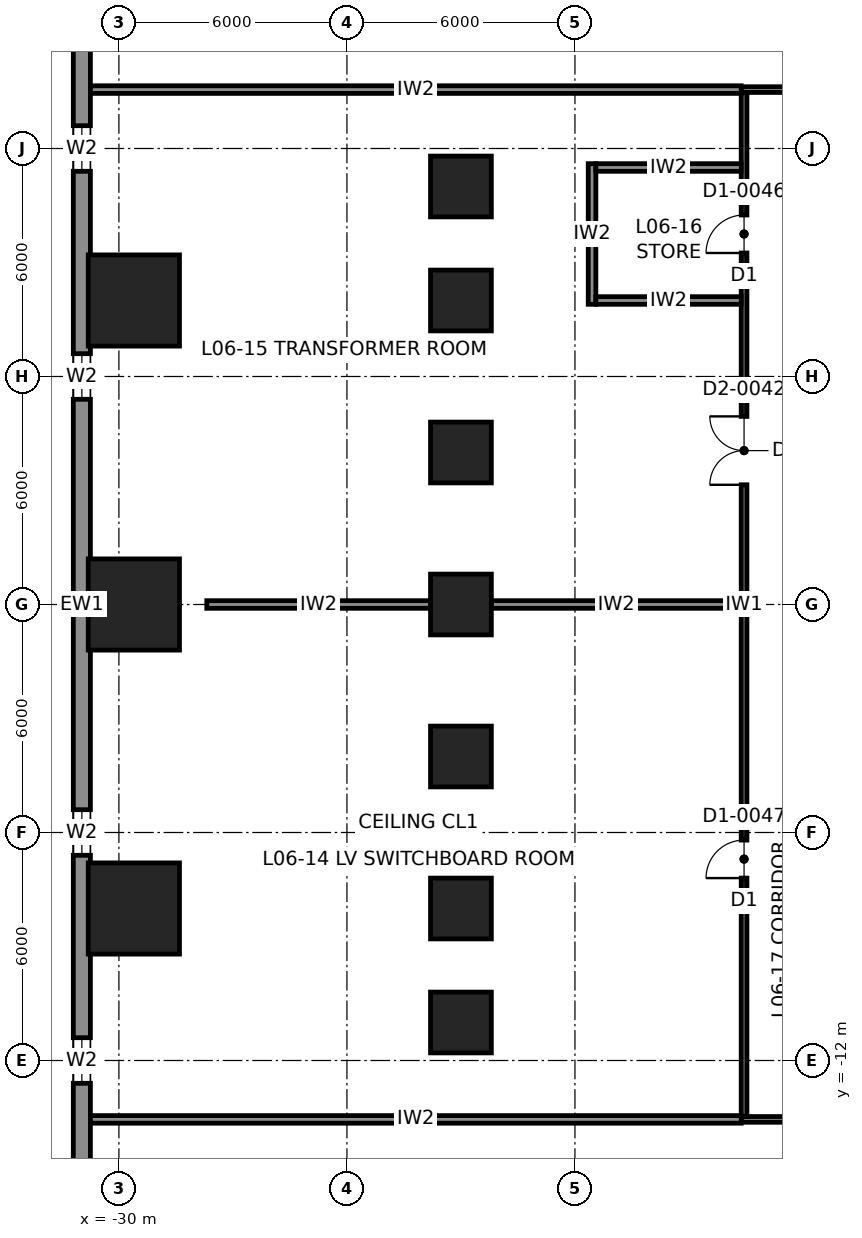
"""IFC4 building model, lengths in metres.
Left out: names, types, materials, properties, quantities, classifications, styles, units other than length and angle.
Written with IfcOpenShell. Run it as: python <this file> out.ifc"""

import sys

from ifc_helpers import new_model, si_unit, direction, frame, frame_2d, origin, origin_2d, place, context, subcontext, project, spatial, rectangle, extrude, element, fill, save


model = new_model("IFC4")
c1 = context("Model", 3, precision=1e-05, world=origin(), true_north=direction((0.0, 1.0)))
c2 = subcontext(c1, "Body", "Model", "MODEL_VIEW")
j1 = project(units=[si_unit("LENGTHUNIT", "METRE"), si_unit("PLANEANGLEUNIT", "RADIAN")], contexts=[c1])
p1 = place(None, origin())
s1 = spatial("IfcSite", under=j1, at=p1, CompositionType="ELEMENT")
p2 = place(p1, origin())
s2 = spatial("IfcBuilding", under=s1, at=p2, CompositionType="ELEMENT")
p3 = place(p2, frame((0.0, 0.0, 32.0)))
s3 = spatial("IfcBuildingStorey", under=s2, at=p3, CompositionType="ELEMENT", Elevation=32.0)
for number, where, z_axis, x_axis in (
    (1, (-29.606, 0.0, 0.0), (0.04, 0.0, 0.999), (0.0, 1.0, 0.0)),
    (2, (-29.606, 8.0, 0.0), (0.04, 0.0, 0.999), (0.0, 1.0, 0.0)),
    (3, (-29.606, -8.0, 0.0), (0.04, 0.0, 0.999), (0.0, 1.0, 0.0)),
):
    element("IfcColumn", number, at=place(p3, frame(where, z_axis=z_axis, x_axis=x_axis)), inside=s3, PredefinedType="COLUMN", context=c2, shape_type="SweptSolid", body=[
        extrude(rectangle(XDim=2.4, YDim=2.4, at=origin_2d()), origin(), (0.0, 0.0, 1.0), 5.504),
    ])
for number, where, z_axis, x_axis in (
    (4, (-21.0, 0.0, 0.0), (0.0, 0.0, 1.0), (1.0, 0.0, 0.0)),
    (5, (-21.0, 4.0, 0.0), (0.0, 0.0, 1.0), (1.0, 0.0, 0.0)),
    (6, (-21.0, -4.0, 0.0), (0.0, 0.0, 1.0), (1.0, 0.0, 0.0)),
    (7, (-21.0, 8.0, 0.0), (0.0, 0.0, 1.0), (1.0, 0.0, 0.0)),
    (8, (-21.0, -8.0, 0.0), (0.0, 0.0, 1.0), (1.0, 0.0, 0.0)),
    (9, (-21.0, 11.0, 0.0), (0.0, 0.0, 1.0), (1.0, 0.0, 0.0)),
    (10, (-21.0, -11.0, 0.0), (0.0, 0.0, 1.0), (1.0, 0.0, 0.0)),
):
    element("IfcColumn", number, at=place(p3, frame(where, z_axis=z_axis, x_axis=x_axis)), inside=s3, PredefinedType="COLUMN", context=c2, shape_type="SweptSolid", body=[
        extrude(rectangle(XDim=1.6, YDim=1.6, at=origin_2d()), origin(), (0.0, 0.0, 1.0), 5.5),
    ])
p4 = place(p3, frame((-30.975, 26.7, 0.0), z_axis=(0.0, 0.0, 1.0), x_axis=(0.0, -1.0, 0.0)))
e11 = element("IfcWall", 11, at=p4, inside=s3, PredefinedType="SOLIDWALL", context=c2, shape_type="SweptSolid", body=[
    extrude(rectangle(XDim=53.4, YDim=0.45, at=frame_2d((26.7, 0.0))), origin(), (0.0, 0.0, 1.0), 5.3),
])
p5 = place(p4, frame((8.1, 0.0, 0.9)))
e12 = element("IfcOpeningElement", 12, at=p5, cuts=e11, PredefinedType="OPENING", context=c2, shape_type="SweptSolid", body=[
    extrude(rectangle(XDim=1.2, YDim=2.0, at=frame_2d((0.6, 1.0))), frame((0.0, 0.235, 0.0), z_axis=(0.0, -1.0, 0.0), x_axis=(1.0, 0.0, 0.0)), (0.0, 0.0, 1.0), 0.47),
])
p6 = place(p4, frame((14.1, 0.0, 0.9)))
e13 = element("IfcOpeningElement", 13, at=p6, cuts=e11, PredefinedType="OPENING", context=c2, shape_type="SweptSolid", body=[
    extrude(rectangle(XDim=1.2, YDim=2.0, at=frame_2d((0.6, 1.0))), frame((0.0, 0.235, 0.0), z_axis=(0.0, -1.0, 0.0), x_axis=(1.0, 0.0, 0.0)), (0.0, 0.0, 1.0), 0.47),
])
p7 = place(p4, frame((20.1, 0.0, 0.9)))
e14 = element("IfcOpeningElement", 14, at=p7, cuts=e11, PredefinedType="OPENING", context=c2, shape_type="SweptSolid", body=[
    extrude(rectangle(XDim=1.2, YDim=2.0, at=frame_2d((0.6, 1.0))), frame((0.0, 0.235, 0.0), z_axis=(0.0, -1.0, 0.0), x_axis=(1.0, 0.0, 0.0)), (0.0, 0.0, 1.0), 0.47),
])
p8 = place(p4, frame((32.1, 0.0, 0.9)))
e15 = element("IfcOpeningElement", 15, at=p8, cuts=e11, PredefinedType="OPENING", context=c2, shape_type="SweptSolid", body=[
    extrude(rectangle(XDim=1.2, YDim=2.0, at=frame_2d((0.6, 1.0))), frame((0.0, 0.235, 0.0), z_axis=(0.0, -1.0, 0.0), x_axis=(1.0, 0.0, 0.0)), (0.0, 0.0, 1.0), 0.47),
])
p9 = place(p4, frame((38.1, 0.0, 0.9)))
e16 = element("IfcOpeningElement", 16, at=p9, cuts=e11, PredefinedType="OPENING", context=c2, shape_type="SweptSolid", body=[
    extrude(rectangle(XDim=1.2, YDim=2.0, at=frame_2d((0.6, 1.0))), frame((0.0, 0.235, 0.0), z_axis=(0.0, -1.0, 0.0), x_axis=(1.0, 0.0, 0.0)), (0.0, 0.0, 1.0), 0.47),
])
p10 = place(p4, frame((44.1, 0.0, 0.9)))
e17 = element("IfcOpeningElement", 17, at=p10, cuts=e11, PredefinedType="OPENING", context=c2, shape_type="SweptSolid", body=[
    extrude(rectangle(XDim=1.2, YDim=2.0, at=frame_2d((0.6, 1.0))), frame((0.0, 0.235, 0.0), z_axis=(0.0, -1.0, 0.0), x_axis=(1.0, 0.0, 0.0)), (0.0, 0.0, 1.0), 0.47),
])
p11 = place(p3, frame((-13.625, 13.55, 0.0), z_axis=(0.0, 0.0, 1.0), x_axis=(1.0, 0.0, 0.0)))
e18 = element("IfcWall", 18, at=p11, inside=s3, PredefinedType="PARTITIONING", context=c2, shape_type="SweptSolid", body=[
    extrude(rectangle(XDim=27.25, YDim=0.15, at=frame_2d((13.625, 0.0))), origin(), (0.0, 0.0, 1.0), 5.3),
])
p12 = place(p11, frame((2.025, 0.0, 0.0)))
e19 = element("IfcOpeningElement", 19, at=p12, cuts=e18, PredefinedType="OPENING", context=c2, shape_type="SweptSolid", body=[
    extrude(rectangle(XDim=1.8, YDim=2.3, at=frame_2d((0.9, 1.15))), frame((0.0, 0.085, 0.0), z_axis=(0.0, -1.0, 0.0), x_axis=(1.0, 0.0, 0.0)), (0.0, 0.0, 1.0), 0.17),
])
p13 = place(p11, frame((7.225, 0.0, 0.0)))
e20 = element("IfcOpeningElement", 20, at=p13, cuts=e18, PredefinedType="OPENING", context=c2, shape_type="SweptSolid", body=[
    extrude(rectangle(XDim=1.8, YDim=2.3, at=frame_2d((0.9, 1.15))), frame((0.0, 0.085, 0.0), z_axis=(0.0, -1.0, 0.0), x_axis=(1.0, 0.0, 0.0)), (0.0, 0.0, 1.0), 0.17),
])
p14 = place(p11, frame((12.725, 0.0, 0.0)))
e21 = element("IfcOpeningElement", 21, at=p14, cuts=e18, PredefinedType="OPENING", context=c2, shape_type="SweptSolid", body=[
    extrude(rectangle(XDim=1.8, YDim=2.3, at=frame_2d((0.9, 1.15))), frame((0.0, 0.085, 0.0), z_axis=(0.0, -1.0, 0.0), x_axis=(1.0, 0.0, 0.0)), (0.0, 0.0, 1.0), 0.17),
])
p15 = place(p11, frame((18.225, 0.0, 0.0)))
e22 = element("IfcOpeningElement", 22, at=p15, cuts=e18, PredefinedType="OPENING", context=c2, shape_type="SweptSolid", body=[
    extrude(rectangle(XDim=1.8, YDim=2.3, at=frame_2d((0.9, 1.15))), frame((0.0, 0.085, 0.0), z_axis=(0.0, -1.0, 0.0), x_axis=(1.0, 0.0, 0.0)), (0.0, 0.0, 1.0), 0.17),
])
p16 = place(p11, frame((23.425, 0.0, 0.0)))
e23 = element("IfcOpeningElement", 23, at=p16, cuts=e18, PredefinedType="OPENING", context=c2, shape_type="SweptSolid", body=[
    extrude(rectangle(XDim=1.8, YDim=2.3, at=frame_2d((0.9, 1.15))), frame((0.0, 0.085, 0.0), z_axis=(0.0, -1.0, 0.0), x_axis=(1.0, 0.0, 0.0)), (0.0, 0.0, 1.0), 0.17),
])
p17 = place(p3, frame((13.625, -13.55, 0.0), z_axis=(0.0, 0.0, 1.0), x_axis=(-1.0, 0.0, 0.0)))
e24 = element("IfcWall", 24, at=p17, inside=s3, PredefinedType="PARTITIONING", context=c2, shape_type="SweptSolid", body=[
    extrude(rectangle(XDim=27.25, YDim=0.15, at=frame_2d((13.625, 0.0))), origin(), (0.0, 0.0, 1.0), 5.3),
])
p18 = place(p17, frame((23.425, 0.0, 0.0)))
e25 = element("IfcOpeningElement", 25, at=p18, cuts=e24, PredefinedType="OPENING", context=c2, shape_type="SweptSolid", body=[
    extrude(rectangle(XDim=1.8, YDim=2.3, at=frame_2d((0.9, 1.15))), frame((0.0, 0.085, 0.0), z_axis=(0.0, -1.0, 0.0), x_axis=(1.0, 0.0, 0.0)), (0.0, 0.0, 1.0), 0.17),
])
p19 = place(p17, frame((19.575, 0.0, 0.0)))
e26 = element("IfcOpeningElement", 26, at=p19, cuts=e24, PredefinedType="OPENING", context=c2, shape_type="SweptSolid", body=[
    extrude(rectangle(XDim=1.0, YDim=2.3, at=frame_2d((0.5, 1.15))), frame((0.0, 0.085, 0.0), z_axis=(0.0, -1.0, 0.0), x_axis=(1.0, 0.0, 0.0)), (0.0, 0.0, 1.0), 0.17),
])
p20 = place(p17, frame((2.025, 0.0, 0.0)))
e27 = element("IfcOpeningElement", 27, at=p20, cuts=e24, PredefinedType="OPENING", context=c2, shape_type="SweptSolid", body=[
    extrude(rectangle(XDim=1.8, YDim=2.3, at=frame_2d((0.9, 1.15))), frame((0.0, 0.085, 0.0), z_axis=(0.0, -1.0, 0.0), x_axis=(1.0, 0.0, 0.0)), (0.0, 0.0, 1.0), 0.17),
])
p21 = place(p17, frame((16.125, 0.0, 0.0)))
e28 = element("IfcOpeningElement", 28, at=p21, cuts=e24, PredefinedType="OPENING", context=c2, shape_type="SweptSolid", body=[
    extrude(rectangle(XDim=1.0, YDim=2.3, at=frame_2d((0.5, 1.15))), frame((0.0, 0.085, 0.0), z_axis=(0.0, -1.0, 0.0), x_axis=(1.0, 0.0, 0.0)), (0.0, 0.0, 1.0), 0.17),
])
p22 = place(p17, frame((9.625, 0.0, 0.0)))
e29 = element("IfcOpeningElement", 29, at=p22, cuts=e24, PredefinedType="OPENING", context=c2, shape_type="SweptSolid", body=[
    extrude(rectangle(XDim=1.0, YDim=2.3, at=frame_2d((0.5, 1.15))), frame((0.0, 0.085, 0.0), z_axis=(0.0, -1.0, 0.0), x_axis=(1.0, 0.0, 0.0)), (0.0, 0.0, 1.0), 0.17),
])
p23 = place(p3, frame((-13.55, 13.475, 0.0), z_axis=(0.0, 0.0, 1.0), x_axis=(0.0, -1.0, 0.0)))
e30 = element("IfcWall", 30, at=p23, inside=s3, PredefinedType="PARTITIONING", context=c2, shape_type="SweptSolid", body=[
    extrude(rectangle(XDim=26.95, YDim=0.15, at=frame_2d((13.475, 0.0))), origin(), (0.0, 0.0, 1.0), 5.3),
])
p24 = place(p23, frame((19.675, 0.0, 0.0)))
e31 = element("IfcOpeningElement", 31, at=p24, cuts=e30, PredefinedType="OPENING", context=c2, shape_type="SweptSolid", body=[
    extrude(rectangle(XDim=1.0, YDim=2.3, at=frame_2d((0.5, 1.15))), frame((0.0, 0.085, 0.0), z_axis=(0.0, -1.0, 0.0), x_axis=(1.0, 0.0, 0.0)), (0.0, 0.0, 1.0), 0.17),
])
p25 = place(p23, frame((8.525, 0.0, 0.0)))
e32 = element("IfcOpeningElement", 32, at=p25, cuts=e30, PredefinedType="OPENING", context=c2, shape_type="SweptSolid", body=[
    extrude(rectangle(XDim=1.8, YDim=2.3, at=frame_2d((0.9, 1.15))), frame((0.0, 0.085, 0.0), z_axis=(0.0, -1.0, 0.0), x_axis=(1.0, 0.0, 0.0)), (0.0, 0.0, 1.0), 0.17),
])
p26 = place(p23, frame((3.225, 0.0, 0.0)))
e33 = element("IfcOpeningElement", 33, at=p26, cuts=e30, PredefinedType="OPENING", context=c2, shape_type="SweptSolid", body=[
    extrude(rectangle(XDim=1.0, YDim=2.3, at=frame_2d((0.5, 1.15))), frame((0.0, 0.085, 0.0), z_axis=(0.0, -1.0, 0.0), x_axis=(1.0, 0.0, 0.0)), (0.0, 0.0, 1.0), 0.17),
])
for number, where, z_axis, x_axis in (
    (34, (-30.75, 13.55, 0.0), (0.0, 0.0, 1.0), (1.0, 0.0, 0.0)),
    (35, (-13.625, -13.55, 0.0), (0.0, 0.0, 1.0), (-1.0, 0.0, 0.0)),
):
    element("IfcWall", number, at=place(p3, frame(where, z_axis=z_axis, x_axis=x_axis)), inside=s3, PredefinedType="PARTITIONING", context=c2, shape_type="SweptSolid", body=[
        extrude(rectangle(XDim=17.125, YDim=0.2, at=frame_2d((8.562, 0.0))), origin(), (0.0, 0.0, 1.0), 5.3),
    ])
p27 = place(p3, frame((-13.625, 0.0, 0.0), z_axis=(0.0, 0.0, 1.0), x_axis=(-1.0, 0.0, 0.0)))
e36 = element("IfcWall", 36, at=p27, inside=s3, PredefinedType="PARTITIONING", context=c2, shape_type="SweptSolid", body=[
    extrude(rectangle(XDim=6.575, YDim=0.2, at=frame_2d((3.288, 0.0))), origin(), (0.0, 0.0, 1.0), 4.731),
])
p28 = place(p3, frame((-21.8, 0.0, 0.0), z_axis=(0.0, 0.0, 1.0), x_axis=(-1.0, 0.0, 0.0)))
e37 = element("IfcWall", 37, at=p28, inside=s3, PredefinedType="PARTITIONING", context=c2, shape_type="SweptSolid", body=[
    extrude(rectangle(XDim=5.887, YDim=0.2, at=frame_2d((2.944, 0.0))), origin(), (0.0, 0.0, 1.0), 4.731),
])
p29 = place(p3, frame((-17.55, 7.9, 0.0), z_axis=(0.0, 0.0, 1.0), x_axis=(0.0, 1.0, 0.0)))
e38 = element("IfcWall", 38, at=p29, inside=s3, PredefinedType="PARTITIONING", context=c2, shape_type="SweptSolid", body=[
    extrude(rectangle(XDim=3.7, YDim=0.2, at=frame_2d((1.85, 0.0))), origin(), (0.0, 0.0, 1.0), 5.3),
])
p30 = place(p3, frame((-13.625, 8.0, 0.0), z_axis=(0.0, 0.0, 1.0), x_axis=(-1.0, 0.0, 0.0)))
e39 = element("IfcWall", 39, at=p30, inside=s3, PredefinedType="PARTITIONING", context=c2, shape_type="SweptSolid", body=[
    extrude(rectangle(XDim=3.825, YDim=0.2, at=frame_2d((1.913, 0.0))), origin(), (0.0, 0.0, 1.0), 4.731),
])
p31 = place(p3, frame((-13.625, 11.5, 0.0), z_axis=(0.0, 0.0, 1.0), x_axis=(-1.0, 0.0, 0.0)))
e40 = element("IfcWall", 40, at=p31, inside=s3, PredefinedType="PARTITIONING", context=c2, shape_type="SweptSolid", body=[
    extrude(rectangle(XDim=3.825, YDim=0.2, at=frame_2d((1.913, 0.0))), origin(), (0.0, 0.0, 1.0), 5.3),
])
p32 = place(p6, origin())
e41 = element("IfcWindow", 41, at=p32, inside=s3, PartitioningType="SINGLE_PANEL", PredefinedType="WINDOW", context=c2, shape_type="SweptSolid", body=[
    extrude(rectangle(XDim=1.2, YDim=2.0, at=frame_2d((0.6, 1.0))), frame((0.0, 0.03, 0.0), z_axis=(0.0, -1.0, 0.0), x_axis=(1.0, 0.0, 0.0)), (0.0, 0.0, 1.0), 0.06),
])
fill(e13, e41)
p33 = place(p7, origin())
e42 = element("IfcWindow", 42, at=p33, inside=s3, PartitioningType="SINGLE_PANEL", PredefinedType="WINDOW", context=c2, shape_type="SweptSolid", body=[
    extrude(rectangle(XDim=1.2, YDim=2.0, at=frame_2d((0.6, 1.0))), frame((0.0, 0.03, 0.0), z_axis=(0.0, -1.0, 0.0), x_axis=(1.0, 0.0, 0.0)), (0.0, 0.0, 1.0), 0.06),
])
fill(e14, e42)
p34 = place(p8, origin())
e43 = element("IfcWindow", 43, at=p34, inside=s3, PartitioningType="SINGLE_PANEL", PredefinedType="WINDOW", context=c2, shape_type="SweptSolid", body=[
    extrude(rectangle(XDim=1.2, YDim=2.0, at=frame_2d((0.6, 1.0))), frame((0.0, 0.03, 0.0), z_axis=(0.0, -1.0, 0.0), x_axis=(1.0, 0.0, 0.0)), (0.0, 0.0, 1.0), 0.06),
])
fill(e15, e43)
p35 = place(p9, origin())
e44 = element("IfcWindow", 44, at=p35, inside=s3, PartitioningType="SINGLE_PANEL", PredefinedType="WINDOW", context=c2, shape_type="SweptSolid", body=[
    extrude(rectangle(XDim=1.2, YDim=2.0, at=frame_2d((0.6, 1.0))), frame((0.0, 0.03, 0.0), z_axis=(0.0, -1.0, 0.0), x_axis=(1.0, 0.0, 0.0)), (0.0, 0.0, 1.0), 0.06),
])
fill(e16, e44)
p36 = place(p24, frame((1.0, 0.0, 0.0), z_axis=(0.0, 0.0, 1.0), x_axis=(-1.0, 0.0, 0.0)))
e45 = element("IfcDoor", 45, at=p36, inside=s3, OperationType="SINGLE_SWING_LEFT", PredefinedType="DOOR", context=c2, shape_type="SweptSolid", body=[
    extrude(rectangle(XDim=1.0, YDim=2.3, at=frame_2d((0.5, 1.15))), frame((0.0, 0.025, 0.0), z_axis=(0.0, -1.0, 0.0), x_axis=(1.0, 0.0, 0.0)), (0.0, 0.0, 1.0), 0.05),
])
fill(e31, e45)
p37 = place(p25, frame((1.8, 0.0, 0.0), z_axis=(0.0, 0.0, 1.0), x_axis=(-1.0, 0.0, 0.0)))
e46 = element("IfcDoor", 46, at=p37, inside=s3, OperationType="DOUBLE_DOOR_DOUBLE_SWING", PredefinedType="DOOR", context=c2, shape_type="SweptSolid", body=[
    extrude(rectangle(XDim=1.8, YDim=2.3, at=frame_2d((0.9, 1.15))), frame((0.0, 0.025, 0.0), z_axis=(0.0, -1.0, 0.0), x_axis=(1.0, 0.0, 0.0)), (0.0, 0.0, 1.0), 0.05),
])
fill(e32, e46)
p38 = place(p26, frame((1.0, 0.0, 0.0), z_axis=(0.0, 0.0, 1.0), x_axis=(-1.0, 0.0, 0.0)))
e47 = element("IfcDoor", 47, at=p38, inside=s3, OperationType="SINGLE_SWING_LEFT", PredefinedType="DOOR", context=c2, shape_type="SweptSolid", body=[
    extrude(rectangle(XDim=1.0, YDim=2.3, at=frame_2d((0.5, 1.15))), frame((0.0, 0.025, 0.0), z_axis=(0.0, -1.0, 0.0), x_axis=(1.0, 0.0, 0.0)), (0.0, 0.0, 1.0), 0.05),
])
fill(e33, e47)
save(model, sys.argv[1])
